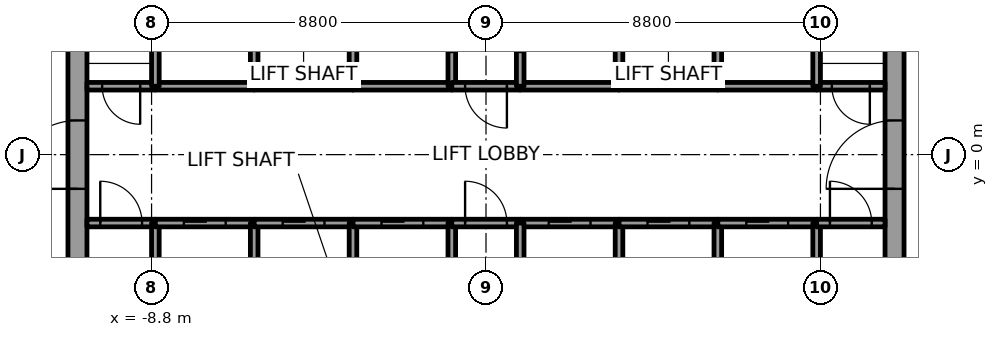
"""IFC4 building model, lengths in metres.
Left out: names, types, materials, properties, quantities, classifications, styles, units other than length and angle.
Written with IfcOpenShell. Run it as: python <this file> out.ifc"""

import sys

from ifc_helpers import new_model, si_unit, direction, frame, frame_2d, origin, place, context, subcontext, project, spatial, rectangle, extrude, element, fill, save


model = new_model("IFC4")
c1 = context("Model", 3, precision=1e-05, world=origin(), true_north=direction((0.0, 1.0)))
c2 = subcontext(c1, "Body", "Model", "MODEL_VIEW")
j1 = project(units=[si_unit("LENGTHUNIT", "METRE"), si_unit("PLANEANGLEUNIT", "RADIAN")], contexts=[c1])
p1 = place(None, origin())
s1 = spatial("IfcSite", under=j1, at=p1, CompositionType="ELEMENT")
p2 = place(p1, origin())
s2 = spatial("IfcBuilding", under=s1, at=p2, CompositionType="ELEMENT")
p3 = place(p2, frame((0.0, 0.0, 48.0)))
s3 = spatial("IfcBuildingStorey", under=s2, at=p3, CompositionType="ELEMENT", Elevation=48.0)
p4 = place(p3, frame((-10.75, -7.5, 0.0), z_axis=(0.0, 0.0, 1.0), x_axis=(0.0, 1.0, 0.0)))
e1 = element("IfcWall", 1, at=p4, inside=s3, PredefinedType="SHEAR", context=c2, shape_type="SweptSolid", body=[
    extrude(rectangle(XDim=15.0, YDim=0.5, at=frame_2d((7.5, 0.0))), origin(), (0.0, 0.0, 1.0), 3.7),
])
p5 = place(p4, frame((6.6, 0.0, 0.0)))
e2 = element("IfcOpeningElement", 2, at=p5, cuts=e1, PredefinedType="OPENING", context=c2, shape_type="SweptSolid", body=[
    extrude(rectangle(XDim=1.8, YDim=2.1, at=frame_2d((0.9, 1.05))), frame((0.0, 0.25, 0.0), z_axis=(0.0, -1.0, 0.0), x_axis=(1.0, 0.0, 0.0)), (0.0, 0.0, 1.0), 0.5),
])
p6 = place(p3, frame((10.75, -7.5, 0.0), z_axis=(0.0, 0.0, 1.0), x_axis=(0.0, 1.0, 0.0)))
e3 = element("IfcWall", 3, at=p6, inside=s3, PredefinedType="SHEAR", context=c2, shape_type="SweptSolid", body=[
    extrude(rectangle(XDim=15.0, YDim=0.5, at=frame_2d((7.5, 0.0))), origin(), (0.0, 0.0, 1.0), 3.7),
])
p7 = place(p6, frame((6.6, 0.0, 0.0)))
e4 = element("IfcOpeningElement", 4, at=p7, cuts=e3, PredefinedType="OPENING", context=c2, shape_type="SweptSolid", body=[
    extrude(rectangle(XDim=1.8, YDim=2.1, at=frame_2d((0.9, 1.05))), frame((0.0, 0.25, 0.0), z_axis=(0.0, -1.0, 0.0), x_axis=(1.0, 0.0, 0.0)), (0.0, 0.0, 1.0), 0.5),
])
p8 = place(p3, frame((-10.5, -1.8, 0.0), z_axis=(0.0, 0.0, 1.0), x_axis=(1.0, 0.0, 0.0)))
e5 = element("IfcWall", 5, at=p8, inside=s3, PredefinedType="SOLIDWALL", context=c2, shape_type="SweptSolid", body=[
    extrude(rectangle(XDim=1.8, YDim=0.2, at=frame_2d((0.9, 0.0))), origin(), (0.0, 0.0, 1.0), 3.55),
])
p9 = place(p8, frame((0.35, 0.0, 0.0)))
e6 = element("IfcOpeningElement", 6, at=p9, cuts=e5, PredefinedType="OPENING", context=c2, shape_type="SweptSolid", body=[
    extrude(rectangle(XDim=1.1, YDim=2.1, at=frame_2d((0.55, 1.05))), frame((0.0, 0.1, 0.0), z_axis=(0.0, -1.0, 0.0), x_axis=(1.0, 0.0, 0.0)), (0.0, 0.0, 1.0), 0.2),
])
p10 = place(p3, frame((-8.7, 1.8, 0.0), z_axis=(0.0, 0.0, 1.0), x_axis=(-1.0, 0.0, 0.0)))
e7 = element("IfcWall", 7, at=p10, inside=s3, PredefinedType="SOLIDWALL", context=c2, shape_type="SweptSolid", body=[
    extrude(rectangle(XDim=1.8, YDim=0.2, at=frame_2d((0.9, 0.0))), origin(), (0.0, 0.0, 1.0), 3.55),
])
p11 = place(p10, frame((0.4, 0.0, 0.0)))
e8 = element("IfcOpeningElement", 8, at=p11, cuts=e7, PredefinedType="OPENING", context=c2, shape_type="SweptSolid", body=[
    extrude(rectangle(XDim=1.0, YDim=2.1, at=frame_2d((0.5, 1.05))), frame((0.0, 0.1, 0.0), z_axis=(0.0, -1.0, 0.0), x_axis=(1.0, 0.0, 0.0)), (0.0, 0.0, 1.0), 0.2),
])
p12 = place(p3, frame((-8.7, -4.6, 0.0), z_axis=(0.0, 0.0, 1.0), x_axis=(0.0, 1.0, 0.0)))
e9 = element("IfcWall", 9, at=p12, inside=s3, PredefinedType="SOLIDWALL", context=c2, shape_type="SweptSolid", body=[
    extrude(rectangle(XDim=2.8, YDim=0.2, at=frame_2d((1.4, 0.0))), origin(), (0.0, 0.0, 1.0), 3.55),
])
p13 = place(p3, frame((-8.7, -1.8, 0.0), z_axis=(0.0, 0.0, 1.0), x_axis=(1.0, 0.0, 0.0)))
e10 = element("IfcWall", 10, at=p13, inside=s3, PredefinedType="SOLIDWALL", context=c2, shape_type="SweptSolid", body=[
    extrude(rectangle(XDim=2.6, YDim=0.2, at=frame_2d((1.3, 0.0))), origin(), (0.0, 0.0, 1.0), 3.55),
])
p14 = place(p13, frame((0.75, 0.0, 0.0)))
e11 = element("IfcOpeningElement", 11, at=p14, cuts=e10, PredefinedType="OPENING", context=c2, shape_type="SweptSolid", body=[
    extrude(rectangle(XDim=1.1, YDim=2.1, at=frame_2d((0.55, 1.05))), frame((0.0, 0.1, 0.0), z_axis=(0.0, -1.0, 0.0), x_axis=(1.0, 0.0, 0.0)), (0.0, 0.0, 1.0), 0.2),
])
p15 = place(p3, frame((-6.1, 1.8, 0.0), z_axis=(0.0, 0.0, 1.0), x_axis=(-1.0, 0.0, 0.0)))
e12 = element("IfcWall", 12, at=p15, inside=s3, PredefinedType="SOLIDWALL", context=c2, shape_type="SweptSolid", body=[
    extrude(rectangle(XDim=2.6, YDim=0.2, at=frame_2d((1.3, 0.0))), origin(), (0.0, 0.0, 1.0), 3.55),
])
for number, where, z_axis, x_axis in (
    (13, (-8.7, 1.8, 0.0), (0.0, 0.0, 1.0), (0.0, 1.0, 0.0)),
    (14, (-6.1, -4.6, 0.0), (0.0, 0.0, 1.0), (0.0, 1.0, 0.0)),
):
    element("IfcWall", number, at=place(p3, frame(where, z_axis=z_axis, x_axis=x_axis)), inside=s3, PredefinedType="SOLIDWALL", context=c2, shape_type="SweptSolid", body=[
        extrude(rectangle(XDim=2.8, YDim=0.2, at=frame_2d((1.4, 0.0))), origin(), (0.0, 0.0, 1.0), 3.55),
    ])
p16 = place(p3, frame((-6.1, -1.8, 0.0), z_axis=(0.0, 0.0, 1.0), x_axis=(1.0, 0.0, 0.0)))
e15 = element("IfcWall", 15, at=p16, inside=s3, PredefinedType="SOLIDWALL", context=c2, shape_type="SweptSolid", body=[
    extrude(rectangle(XDim=2.6, YDim=0.2, at=frame_2d((1.3, 0.0))), origin(), (0.0, 0.0, 1.0), 3.55),
])
p17 = place(p16, frame((0.75, 0.0, 0.0)))
e16 = element("IfcOpeningElement", 16, at=p17, cuts=e15, PredefinedType="OPENING", context=c2, shape_type="SweptSolid", body=[
    extrude(rectangle(XDim=1.1, YDim=2.1, at=frame_2d((0.55, 1.05))), frame((0.0, 0.1, 0.0), z_axis=(0.0, -1.0, 0.0), x_axis=(1.0, 0.0, 0.0)), (0.0, 0.0, 1.0), 0.2),
])
p18 = place(p3, frame((-3.5, 1.8, 0.0), z_axis=(0.0, 0.0, 1.0), x_axis=(-1.0, 0.0, 0.0)))
e17 = element("IfcWall", 17, at=p18, inside=s3, PredefinedType="SOLIDWALL", context=c2, shape_type="SweptSolid", body=[
    extrude(rectangle(XDim=2.6, YDim=0.2, at=frame_2d((1.3, 0.0))), origin(), (0.0, 0.0, 1.0), 3.55),
])
for number, where, z_axis, x_axis in (
    (18, (-6.1, 1.8, 0.0), (0.0, 0.0, 1.0), (0.0, 1.0, 0.0)),
    (19, (-3.5, -4.6, 0.0), (0.0, 0.0, 1.0), (0.0, 1.0, 0.0)),
):
    element("IfcWall", number, at=place(p3, frame(where, z_axis=z_axis, x_axis=x_axis)), inside=s3, PredefinedType="SOLIDWALL", context=c2, shape_type="SweptSolid", body=[
        extrude(rectangle(XDim=2.8, YDim=0.2, at=frame_2d((1.4, 0.0))), origin(), (0.0, 0.0, 1.0), 3.55),
    ])
p19 = place(p3, frame((-3.5, -1.8, 0.0), z_axis=(0.0, 0.0, 1.0), x_axis=(1.0, 0.0, 0.0)))
e20 = element("IfcWall", 20, at=p19, inside=s3, PredefinedType="SOLIDWALL", context=c2, shape_type="SweptSolid", body=[
    extrude(rectangle(XDim=2.6, YDim=0.2, at=frame_2d((1.3, 0.0))), origin(), (0.0, 0.0, 1.0), 3.55),
])
p20 = place(p19, frame((0.75, 0.0, 0.0)))
e21 = element("IfcOpeningElement", 21, at=p20, cuts=e20, PredefinedType="OPENING", context=c2, shape_type="SweptSolid", body=[
    extrude(rectangle(XDim=1.1, YDim=2.1, at=frame_2d((0.55, 1.05))), frame((0.0, 0.1, 0.0), z_axis=(0.0, -1.0, 0.0), x_axis=(1.0, 0.0, 0.0)), (0.0, 0.0, 1.0), 0.2),
])
p21 = place(p3, frame((-0.9, 1.8, 0.0), z_axis=(0.0, 0.0, 1.0), x_axis=(-1.0, 0.0, 0.0)))
e22 = element("IfcWall", 22, at=p21, inside=s3, PredefinedType="SOLIDWALL", context=c2, shape_type="SweptSolid", body=[
    extrude(rectangle(XDim=2.6, YDim=0.2, at=frame_2d((1.3, 0.0))), origin(), (0.0, 0.0, 1.0), 3.55),
])
p22 = place(p3, frame((-3.5, 4.6, 0.0), z_axis=(0.0, 0.0, 1.0), x_axis=(0.0, -1.0, 0.0)))
e23 = element("IfcWall", 23, at=p22, inside=s3, PredefinedType="SOLIDWALL", context=c2, shape_type="SweptSolid", body=[
    extrude(rectangle(XDim=2.8, YDim=0.2, at=frame_2d((1.4, 0.0))), origin(), (0.0, 0.0, 1.0), 3.55),
])
p23 = place(p3, frame((-0.9, 1.8, 0.0), z_axis=(0.0, 0.0, 1.0), x_axis=(0.0, 1.0, 0.0)))
e24 = element("IfcWall", 24, at=p23, inside=s3, PredefinedType="SOLIDWALL", context=c2, shape_type="SweptSolid", body=[
    extrude(rectangle(XDim=3.0, YDim=0.2, at=frame_2d((1.5, 0.0))), origin(), (0.0, 0.0, 1.0), 3.55),
])
p24 = place(p23, frame((0.9, 0.0, 0.0)))
e25 = element("IfcOpeningElement", 25, at=p24, cuts=e24, PredefinedType="OPENING", context=c2, shape_type="SweptSolid", body=[
    extrude(rectangle(XDim=1.2, YDim=2.1, at=frame_2d((0.6, 1.05))), frame((0.0, 0.1, 0.0), z_axis=(0.0, -1.0, 0.0), x_axis=(1.0, 0.0, 0.0)), (0.0, 0.0, 1.0), 0.2),
])
p25 = place(p3, frame((-0.9, -4.6, 0.0), z_axis=(0.0, 0.0, 1.0), x_axis=(0.0, 1.0, 0.0)))
e26 = element("IfcWall", 26, at=p25, inside=s3, PredefinedType="SOLIDWALL", context=c2, shape_type="SweptSolid", body=[
    extrude(rectangle(XDim=2.8, YDim=0.2, at=frame_2d((1.4, 0.0))), origin(), (0.0, 0.0, 1.0), 3.55),
])
p26 = place(p3, frame((-0.9, -1.8, 0.0), z_axis=(0.0, 0.0, 1.0), x_axis=(1.0, 0.0, 0.0)))
e27 = element("IfcWall", 27, at=p26, inside=s3, PredefinedType="SOLIDWALL", context=c2, shape_type="SweptSolid", body=[
    extrude(rectangle(XDim=1.8, YDim=0.2, at=frame_2d((0.9, 0.0))), origin(), (0.0, 0.0, 1.0), 3.55),
])
p27 = place(p26, frame((0.35, 0.0, 0.0)))
e28 = element("IfcOpeningElement", 28, at=p27, cuts=e27, PredefinedType="OPENING", context=c2, shape_type="SweptSolid", body=[
    extrude(rectangle(XDim=1.1, YDim=2.1, at=frame_2d((0.55, 1.05))), frame((0.0, 0.1, 0.0), z_axis=(0.0, -1.0, 0.0), x_axis=(1.0, 0.0, 0.0)), (0.0, 0.0, 1.0), 0.2),
])
p28 = place(p3, frame((0.9, 1.8, 0.0), z_axis=(0.0, 0.0, 1.0), x_axis=(-1.0, 0.0, 0.0)))
e29 = element("IfcWall", 29, at=p28, inside=s3, PredefinedType="SOLIDWALL", context=c2, shape_type="SweptSolid", body=[
    extrude(rectangle(XDim=1.8, YDim=0.2, at=frame_2d((0.9, 0.0))), origin(), (0.0, 0.0, 1.0), 3.55),
])
p29 = place(p28, frame((0.35, 0.0, 0.0)))
e30 = element("IfcOpeningElement", 30, at=p29, cuts=e29, PredefinedType="OPENING", context=c2, shape_type="SweptSolid", body=[
    extrude(rectangle(XDim=1.1, YDim=2.1, at=frame_2d((0.55, 1.05))), frame((0.0, 0.1, 0.0), z_axis=(0.0, -1.0, 0.0), x_axis=(1.0, 0.0, 0.0)), (0.0, 0.0, 1.0), 0.2),
])
p30 = place(p3, frame((0.9, -1.8, 0.0), z_axis=(0.0, 0.0, 1.0), x_axis=(1.0, 0.0, 0.0)))
e31 = element("IfcWall", 31, at=p30, inside=s3, PredefinedType="SOLIDWALL", context=c2, shape_type="SweptSolid", body=[
    extrude(rectangle(XDim=2.6, YDim=0.2, at=frame_2d((1.3, 0.0))), origin(), (0.0, 0.0, 1.0), 3.55),
])
p31 = place(p30, frame((0.75, 0.0, 0.0)))
e32 = element("IfcOpeningElement", 32, at=p31, cuts=e31, PredefinedType="OPENING", context=c2, shape_type="SweptSolid", body=[
    extrude(rectangle(XDim=1.1, YDim=2.1, at=frame_2d((0.55, 1.05))), frame((0.0, 0.1, 0.0), z_axis=(0.0, -1.0, 0.0), x_axis=(1.0, 0.0, 0.0)), (0.0, 0.0, 1.0), 0.2),
])
p32 = place(p3, frame((0.9, -1.8, 0.0), z_axis=(0.0, 0.0, 1.0), x_axis=(0.0, -1.0, 0.0)))
e33 = element("IfcWall", 33, at=p32, inside=s3, PredefinedType="SOLIDWALL", context=c2, shape_type="SweptSolid", body=[
    extrude(rectangle(XDim=2.8, YDim=0.2, at=frame_2d((1.4, 0.0))), origin(), (0.0, 0.0, 1.0), 3.55),
])
p33 = place(p3, frame((3.5, 1.8, 0.0), z_axis=(0.0, 0.0, 1.0), x_axis=(-1.0, 0.0, 0.0)))
e34 = element("IfcWall", 34, at=p33, inside=s3, PredefinedType="SOLIDWALL", context=c2, shape_type="SweptSolid", body=[
    extrude(rectangle(XDim=2.6, YDim=0.2, at=frame_2d((1.3, 0.0))), origin(), (0.0, 0.0, 1.0), 3.55),
])
p34 = place(p3, frame((0.9, 4.8, 0.0), z_axis=(0.0, 0.0, 1.0), x_axis=(0.0, -1.0, 0.0)))
e35 = element("IfcWall", 35, at=p34, inside=s3, PredefinedType="SOLIDWALL", context=c2, shape_type="SweptSolid", body=[
    extrude(rectangle(XDim=3.0, YDim=0.2, at=frame_2d((1.5, 0.0))), origin(), (0.0, 0.0, 1.0), 3.55),
])
p35 = place(p34, frame((0.9, 0.0, 0.0)))
e36 = element("IfcOpeningElement", 36, at=p35, cuts=e35, PredefinedType="OPENING", context=c2, shape_type="SweptSolid", body=[
    extrude(rectangle(XDim=1.2, YDim=2.1, at=frame_2d((0.6, 1.05))), frame((0.0, 0.1, 0.0), z_axis=(0.0, -1.0, 0.0), x_axis=(1.0, 0.0, 0.0)), (0.0, 0.0, 1.0), 0.2),
])
p36 = place(p3, frame((3.5, -4.6, 0.0), z_axis=(0.0, 0.0, 1.0), x_axis=(0.0, 1.0, 0.0)))
e37 = element("IfcWall", 37, at=p36, inside=s3, PredefinedType="SOLIDWALL", context=c2, shape_type="SweptSolid", body=[
    extrude(rectangle(XDim=2.8, YDim=0.2, at=frame_2d((1.4, 0.0))), origin(), (0.0, 0.0, 1.0), 3.55),
])
p37 = place(p3, frame((3.5, -1.8, 0.0), z_axis=(0.0, 0.0, 1.0), x_axis=(1.0, 0.0, 0.0)))
e38 = element("IfcWall", 38, at=p37, inside=s3, PredefinedType="SOLIDWALL", context=c2, shape_type="SweptSolid", body=[
    extrude(rectangle(XDim=2.6, YDim=0.2, at=frame_2d((1.3, 0.0))), origin(), (0.0, 0.0, 1.0), 3.55),
])
p38 = place(p37, frame((0.75, 0.0, 0.0)))
e39 = element("IfcOpeningElement", 39, at=p38, cuts=e38, PredefinedType="OPENING", context=c2, shape_type="SweptSolid", body=[
    extrude(rectangle(XDim=1.1, YDim=2.1, at=frame_2d((0.55, 1.05))), frame((0.0, 0.1, 0.0), z_axis=(0.0, -1.0, 0.0), x_axis=(1.0, 0.0, 0.0)), (0.0, 0.0, 1.0), 0.2),
])
p39 = place(p3, frame((6.1, 1.8, 0.0), z_axis=(0.0, 0.0, 1.0), x_axis=(-1.0, 0.0, 0.0)))
e40 = element("IfcWall", 40, at=p39, inside=s3, PredefinedType="SOLIDWALL", context=c2, shape_type="SweptSolid", body=[
    extrude(rectangle(XDim=2.6, YDim=0.2, at=frame_2d((1.3, 0.0))), origin(), (0.0, 0.0, 1.0), 3.55),
])
for number, where, z_axis, x_axis in (
    (41, (3.5, 1.8, 0.0), (0.0, 0.0, 1.0), (0.0, 1.0, 0.0)),
    (42, (6.1, -4.6, 0.0), (0.0, 0.0, 1.0), (0.0, 1.0, 0.0)),
):
    element("IfcWall", number, at=place(p3, frame(where, z_axis=z_axis, x_axis=x_axis)), inside=s3, PredefinedType="SOLIDWALL", context=c2, shape_type="SweptSolid", body=[
        extrude(rectangle(XDim=2.8, YDim=0.2, at=frame_2d((1.4, 0.0))), origin(), (0.0, 0.0, 1.0), 3.55),
    ])
p40 = place(p3, frame((6.1, -1.8, 0.0), z_axis=(0.0, 0.0, 1.0), x_axis=(1.0, 0.0, 0.0)))
e43 = element("IfcWall", 43, at=p40, inside=s3, PredefinedType="SOLIDWALL", context=c2, shape_type="SweptSolid", body=[
    extrude(rectangle(XDim=2.6, YDim=0.2, at=frame_2d((1.3, 0.0))), origin(), (0.0, 0.0, 1.0), 3.55),
])
p41 = place(p40, frame((0.75, 0.0, 0.0)))
e44 = element("IfcOpeningElement", 44, at=p41, cuts=e43, PredefinedType="OPENING", context=c2, shape_type="SweptSolid", body=[
    extrude(rectangle(XDim=1.1, YDim=2.1, at=frame_2d((0.55, 1.05))), frame((0.0, 0.1, 0.0), z_axis=(0.0, -1.0, 0.0), x_axis=(1.0, 0.0, 0.0)), (0.0, 0.0, 1.0), 0.2),
])
p42 = place(p3, frame((8.7, 1.8, 0.0), z_axis=(0.0, 0.0, 1.0), x_axis=(-1.0, 0.0, 0.0)))
e45 = element("IfcWall", 45, at=p42, inside=s3, PredefinedType="SOLIDWALL", context=c2, shape_type="SweptSolid", body=[
    extrude(rectangle(XDim=2.6, YDim=0.2, at=frame_2d((1.3, 0.0))), origin(), (0.0, 0.0, 1.0), 3.55),
])
for number, where, z_axis, x_axis in (
    (46, (6.1, 1.8, 0.0), (0.0, 0.0, 1.0), (0.0, 1.0, 0.0)),
    (47, (8.7, -1.8, 0.0), (0.0, 0.0, 1.0), (0.0, -1.0, 0.0)),
):
    element("IfcWall", number, at=place(p3, frame(where, z_axis=z_axis, x_axis=x_axis)), inside=s3, PredefinedType="SOLIDWALL", context=c2, shape_type="SweptSolid", body=[
        extrude(rectangle(XDim=2.8, YDim=0.2, at=frame_2d((1.4, 0.0))), origin(), (0.0, 0.0, 1.0), 3.55),
    ])
p43 = place(p3, frame((8.7, -1.8, 0.0), z_axis=(0.0, 0.0, 1.0), x_axis=(1.0, 0.0, 0.0)))
e48 = element("IfcWall", 48, at=p43, inside=s3, PredefinedType="SOLIDWALL", context=c2, shape_type="SweptSolid", body=[
    extrude(rectangle(XDim=1.8, YDim=0.2, at=frame_2d((0.9, 0.0))), origin(), (0.0, 0.0, 1.0), 3.55),
])
p44 = place(p43, frame((0.35, 0.0, 0.0)))
e49 = element("IfcOpeningElement", 49, at=p44, cuts=e48, PredefinedType="OPENING", context=c2, shape_type="SweptSolid", body=[
    extrude(rectangle(XDim=1.1, YDim=2.1, at=frame_2d((0.55, 1.05))), frame((0.0, 0.1, 0.0), z_axis=(0.0, -1.0, 0.0), x_axis=(1.0, 0.0, 0.0)), (0.0, 0.0, 1.0), 0.2),
])
p45 = place(p3, frame((10.5, 1.8, 0.0), z_axis=(0.0, 0.0, 1.0), x_axis=(-1.0, 0.0, 0.0)))
e50 = element("IfcWall", 50, at=p45, inside=s3, PredefinedType="SOLIDWALL", context=c2, shape_type="SweptSolid", body=[
    extrude(rectangle(XDim=1.8, YDim=0.2, at=frame_2d((0.9, 0.0))), origin(), (0.0, 0.0, 1.0), 3.55),
])
p46 = place(p45, frame((0.4, 0.0, 0.0)))
e51 = element("IfcOpeningElement", 51, at=p46, cuts=e50, PredefinedType="OPENING", context=c2, shape_type="SweptSolid", body=[
    extrude(rectangle(XDim=1.0, YDim=2.1, at=frame_2d((0.5, 1.05))), frame((0.0, 0.1, 0.0), z_axis=(0.0, -1.0, 0.0), x_axis=(1.0, 0.0, 0.0)), (0.0, 0.0, 1.0), 0.2),
])
p47 = place(p3, frame((8.7, 4.6, 0.0), z_axis=(0.0, 0.0, 1.0), x_axis=(0.0, -1.0, 0.0)))
e52 = element("IfcWall", 52, at=p47, inside=s3, PredefinedType="SOLIDWALL", context=c2, shape_type="SweptSolid", body=[
    extrude(rectangle(XDim=2.8, YDim=0.2, at=frame_2d((1.4, 0.0))), origin(), (0.0, 0.0, 1.0), 3.55),
])
p48 = place(p14, origin())
e53 = element("IfcDoor", 53, at=p48, inside=s3, OperationType="SLIDING_TO_LEFT", PredefinedType="DOOR", context=c2, shape_type="SweptSolid", body=[
    extrude(rectangle(XDim=1.1, YDim=2.1, at=frame_2d((0.55, 1.05))), frame((0.0, 0.025, 0.0), z_axis=(0.0, -1.0, 0.0), x_axis=(1.0, 0.0, 0.0)), (0.0, 0.0, 1.0), 0.05),
])
fill(e11, e53)
p49 = place(p17, origin())
e54 = element("IfcDoor", 54, at=p49, inside=s3, OperationType="SLIDING_TO_RIGHT", PredefinedType="DOOR", context=c2, shape_type="SweptSolid", body=[
    extrude(rectangle(XDim=1.1, YDim=2.1, at=frame_2d((0.55, 1.05))), frame((0.0, 0.025, 0.0), z_axis=(0.0, -1.0, 0.0), x_axis=(1.0, 0.0, 0.0)), (0.0, 0.0, 1.0), 0.05),
])
fill(e16, e54)
p50 = place(p20, origin())
e55 = element("IfcDoor", 55, at=p50, inside=s3, OperationType="SLIDING_TO_LEFT", PredefinedType="DOOR", context=c2, shape_type="SweptSolid", body=[
    extrude(rectangle(XDim=1.1, YDim=2.1, at=frame_2d((0.55, 1.05))), frame((0.0, 0.025, 0.0), z_axis=(0.0, -1.0, 0.0), x_axis=(1.0, 0.0, 0.0)), (0.0, 0.0, 1.0), 0.05),
])
fill(e21, e55)
p51 = place(p31, origin())
e56 = element("IfcDoor", 56, at=p51, inside=s3, OperationType="SLIDING_TO_RIGHT", PredefinedType="DOOR", context=c2, shape_type="SweptSolid", body=[
    extrude(rectangle(XDim=1.1, YDim=2.1, at=frame_2d((0.55, 1.05))), frame((0.0, 0.025, 0.0), z_axis=(0.0, -1.0, 0.0), x_axis=(1.0, 0.0, 0.0)), (0.0, 0.0, 1.0), 0.05),
])
fill(e32, e56)
p52 = place(p38, origin())
e57 = element("IfcDoor", 57, at=p52, inside=s3, OperationType="SLIDING_TO_RIGHT", PredefinedType="DOOR", context=c2, shape_type="SweptSolid", body=[
    extrude(rectangle(XDim=1.1, YDim=2.1, at=frame_2d((0.55, 1.05))), frame((0.0, 0.025, 0.0), z_axis=(0.0, -1.0, 0.0), x_axis=(1.0, 0.0, 0.0)), (0.0, 0.0, 1.0), 0.05),
])
fill(e39, e57)
p53 = place(p41, origin())
e58 = element("IfcDoor", 58, at=p53, inside=s3, OperationType="SLIDING_TO_RIGHT", PredefinedType="DOOR", context=c2, shape_type="SweptSolid", body=[
    extrude(rectangle(XDim=1.1, YDim=2.1, at=frame_2d((0.55, 1.05))), frame((0.0, 0.025, 0.0), z_axis=(0.0, -1.0, 0.0), x_axis=(1.0, 0.0, 0.0)), (0.0, 0.0, 1.0), 0.05),
])
fill(e44, e58)
p54 = place(p9, origin())
e59 = element("IfcDoor", 59, at=p54, inside=s3, OperationType="SINGLE_SWING_LEFT", PredefinedType="DOOR", context=c2, shape_type="SweptSolid", body=[
    extrude(rectangle(XDim=1.1, YDim=2.1, at=frame_2d((0.55, 1.05))), frame((0.0, 0.025, 0.0), z_axis=(0.0, -1.0, 0.0), x_axis=(1.0, 0.0, 0.0)), (0.0, 0.0, 1.0), 0.05),
])
fill(e6, e59)
p55 = place(p44, origin())
e60 = element("IfcDoor", 60, at=p55, inside=s3, OperationType="SINGLE_SWING_LEFT", PredefinedType="DOOR", context=c2, shape_type="SweptSolid", body=[
    extrude(rectangle(XDim=1.1, YDim=2.1, at=frame_2d((0.55, 1.05))), frame((0.0, 0.025, 0.0), z_axis=(0.0, -1.0, 0.0), x_axis=(1.0, 0.0, 0.0)), (0.0, 0.0, 1.0), 0.05),
])
fill(e49, e60)
p56 = place(p29, origin())
e61 = element("IfcDoor", 61, at=p56, inside=s3, OperationType="SINGLE_SWING_LEFT", PredefinedType="DOOR", context=c2, shape_type="SweptSolid", body=[
    extrude(rectangle(XDim=1.1, YDim=2.1, at=frame_2d((0.55, 1.05))), frame((0.0, 0.025, 0.0), z_axis=(0.0, -1.0, 0.0), x_axis=(1.0, 0.0, 0.0)), (0.0, 0.0, 1.0), 0.05),
])
fill(e30, e61)
p57 = place(p27, origin())
e62 = element("IfcDoor", 62, at=p57, inside=s3, OperationType="SINGLE_SWING_LEFT", PredefinedType="DOOR", context=c2, shape_type="SweptSolid", body=[
    extrude(rectangle(XDim=1.1, YDim=2.1, at=frame_2d((0.55, 1.05))), frame((0.0, 0.025, 0.0), z_axis=(0.0, -1.0, 0.0), x_axis=(1.0, 0.0, 0.0)), (0.0, 0.0, 1.0), 0.05),
])
fill(e28, e62)
p58 = place(p11, origin())
e63 = element("IfcDoor", 63, at=p58, inside=s3, OperationType="SINGLE_SWING_LEFT", PredefinedType="DOOR", context=c2, shape_type="SweptSolid", body=[
    extrude(rectangle(XDim=1.0, YDim=2.1, at=frame_2d((0.5, 1.05))), frame((0.0, 0.025, 0.0), z_axis=(0.0, -1.0, 0.0), x_axis=(1.0, 0.0, 0.0)), (0.0, 0.0, 1.0), 0.05),
])
fill(e8, e63)
p59 = place(p46, origin())
e64 = element("IfcDoor", 64, at=p59, inside=s3, OperationType="SINGLE_SWING_RIGHT", PredefinedType="DOOR", context=c2, shape_type="SweptSolid", body=[
    extrude(rectangle(XDim=1.0, YDim=2.1, at=frame_2d((0.5, 1.05))), frame((0.0, 0.025, 0.0), z_axis=(0.0, -1.0, 0.0), x_axis=(1.0, 0.0, 0.0)), (0.0, 0.0, 1.0), 0.05),
])
fill(e51, e64)
p60 = place(p5, origin())
e65 = element("IfcDoor", 65, at=p60, inside=s3, OperationType="DOUBLE_DOOR_SINGLE_SWING", PredefinedType="DOOR", context=c2, shape_type="SweptSolid", body=[
    extrude(rectangle(XDim=1.8, YDim=2.1, at=frame_2d((0.9, 1.05))), frame((0.0, 0.025, 0.0), z_axis=(0.0, -1.0, 0.0), x_axis=(1.0, 0.0, 0.0)), (0.0, 0.0, 1.0), 0.05),
])
fill(e2, e65)
p61 = place(p7, origin())
e66 = element("IfcDoor", 66, at=p61, inside=s3, OperationType="DOUBLE_DOOR_SINGLE_SWING", PredefinedType="DOOR", context=c2, shape_type="SweptSolid", body=[
    extrude(rectangle(XDim=1.8, YDim=2.1, at=frame_2d((0.9, 1.05))), frame((0.0, 0.025, 0.0), z_axis=(0.0, -1.0, 0.0), x_axis=(1.0, 0.0, 0.0)), (0.0, 0.0, 1.0), 0.05),
])
fill(e4, e66)
save(model, sys.argv[1])
